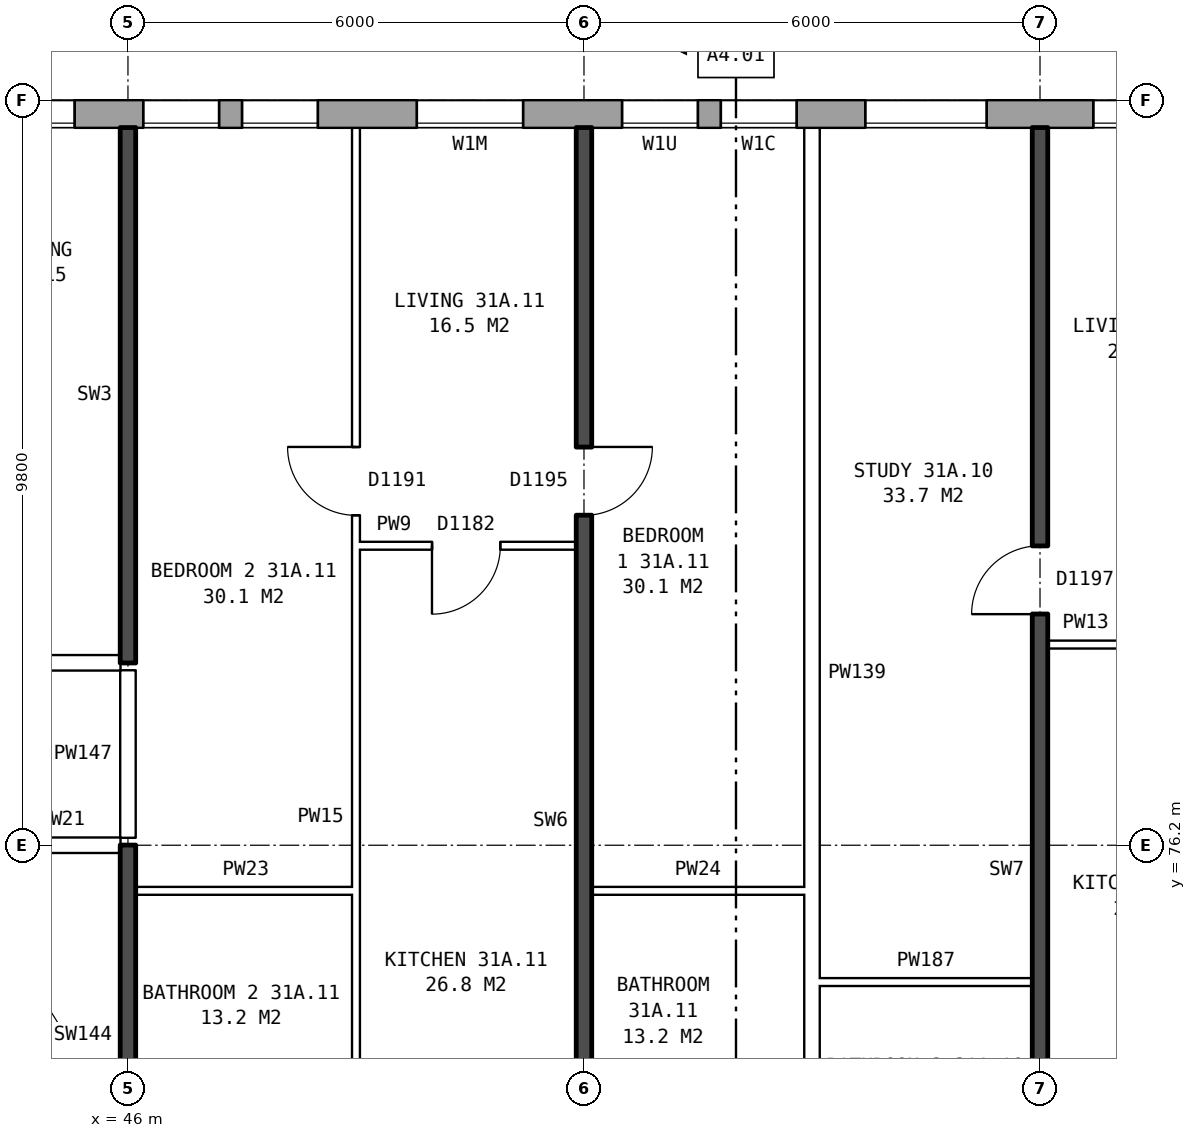
"""IFC4 building model, lengths in metres.
Left out: names, types, materials, properties, quantities, classifications, styles, units other than length and angle.
Written with IfcOpenShell. Run it as: python <this file> out.ifc"""

import sys

from ifc_helpers import new_model, si_unit, direction, frame, frame_2d, origin, place, context, subcontext, project, spatial, rectangle, extrude, element, fill, save


model = new_model("IFC4")
c1 = context("Model", 3, precision=1e-05, world=origin(), true_north=direction((0.0, 1.0)))
c2 = subcontext(c1, "Body", "Model", "MODEL_VIEW")
j1 = project(units=[si_unit("LENGTHUNIT", "METRE"), si_unit("PLANEANGLEUNIT", "RADIAN")], contexts=[c1])
p1 = place(None, origin())
s1 = spatial("IfcSite", under=j1, at=p1, CompositionType="ELEMENT")
p2 = place(p1, origin())
s2 = spatial("IfcBuilding", under=s1, at=p2, CompositionType="ELEMENT")
p3 = place(p2, frame((0.0, 0.0, 111.9)))
s3 = spatial("IfcBuildingStorey", under=s2, at=p3, CompositionType="ELEMENT", Elevation=111.9)
p4 = place(p3, frame((72.925, 85.82, 0.0), z_axis=(0.0, 0.0, 1.0), x_axis=(-1.0, 0.0, 0.0)))
e1 = element("IfcWall", 1, at=p4, inside=s3, PredefinedType="STANDARD", context=c2, shape_type="SweptSolid", body=[
    extrude(rectangle(XDim=44.851, YDim=0.36, at=frame_2d((22.425, 0.0))), origin(), (0.0, 0.0, 1.0), 2.85),
])
p5 = place(p4, frame((0.625, 0.0, 0.8)))
e2 = element("IfcOpeningElement", 2, at=p5, cuts=e1, PredefinedType="OPENING", context=c2, shape_type="SweptSolid", body=[
    extrude(rectangle(XDim=1.6, YDim=1.8, at=frame_2d((0.8, 0.9))), frame((0.0, 0.19, 0.0), z_axis=(0.0, -1.0, 0.0), x_axis=(1.0, 0.0, 0.0)), (0.0, 0.0, 1.0), 0.38),
])
p6 = place(p4, frame((3.625, 0.0, 0.8)))
e3 = element("IfcOpeningElement", 3, at=p6, cuts=e1, PredefinedType="OPENING", context=c2, shape_type="SweptSolid", body=[
    extrude(rectangle(XDim=1.6, YDim=1.8, at=frame_2d((0.8, 0.9))), frame((0.0, 0.19, 0.0), z_axis=(0.0, -1.0, 0.0), x_axis=(1.0, 0.0, 0.0)), (0.0, 0.0, 1.0), 0.38),
])
p7 = place(p4, frame((6.625, 0.0, 0.8)))
e4 = element("IfcOpeningElement", 4, at=p7, cuts=e1, PredefinedType="OPENING", context=c2, shape_type="SweptSolid", body=[
    extrude(rectangle(XDim=1.6, YDim=1.8, at=frame_2d((0.8, 0.9))), frame((0.0, 0.19, 0.0), z_axis=(0.0, -1.0, 0.0), x_axis=(1.0, 0.0, 0.0)), (0.0, 0.0, 1.0), 0.38),
])
p8 = place(p4, frame((9.625, 0.0, 0.8)))
e5 = element("IfcOpeningElement", 5, at=p8, cuts=e1, PredefinedType="OPENING", context=c2, shape_type="SweptSolid", body=[
    extrude(rectangle(XDim=1.6, YDim=1.8, at=frame_2d((0.8, 0.9))), frame((0.0, 0.19, 0.0), z_axis=(0.0, -1.0, 0.0), x_axis=(1.0, 0.0, 0.0)), (0.0, 0.0, 1.0), 0.38),
])
p9 = place(p4, frame((12.625, 0.0, 0.8)))
e6 = element("IfcOpeningElement", 6, at=p9, cuts=e1, PredefinedType="OPENING", context=c2, shape_type="SweptSolid", body=[
    extrude(rectangle(XDim=1.6, YDim=1.8, at=frame_2d((0.8, 0.9))), frame((0.0, 0.19, 0.0), z_axis=(0.0, -1.0, 0.0), x_axis=(1.0, 0.0, 0.0)), (0.0, 0.0, 1.0), 0.38),
])
p10 = place(p4, frame((15.625, 0.0, 0.8)))
e7 = element("IfcOpeningElement", 7, at=p10, cuts=e1, PredefinedType="OPENING", context=c2, shape_type="SweptSolid", body=[
    extrude(rectangle(XDim=1.6, YDim=1.8, at=frame_2d((0.8, 0.9))), frame((0.0, 0.19, 0.0), z_axis=(0.0, -1.0, 0.0), x_axis=(1.0, 0.0, 0.0)), (0.0, 0.0, 1.0), 0.38),
])
p11 = place(p4, frame((18.125, 0.0, 0.8)))
e8 = element("IfcOpeningElement", 8, at=p11, cuts=e1, PredefinedType="OPENING", context=c2, shape_type="SweptSolid", body=[
    extrude(rectangle(XDim=1.0, YDim=1.8, at=frame_2d((0.5, 0.9))), frame((0.0, 0.19, 0.0), z_axis=(0.0, -1.0, 0.0), x_axis=(1.0, 0.0, 0.0)), (0.0, 0.0, 1.0), 0.38),
])
p12 = place(p4, frame((21.725, 0.0, 0.55)))
e9 = element("IfcOpeningElement", 9, at=p12, cuts=e1, PredefinedType="OPENING", context=c2, shape_type="SweptSolid", body=[
    extrude(rectangle(XDim=1.4, YDim=1.2, at=frame_2d((0.7, 0.6))), frame((0.0, 0.19, 0.0), z_axis=(0.0, -1.0, 0.0), x_axis=(1.0, 0.0, 0.0)), (0.0, 0.0, 1.0), 0.38),
])
p13 = place(p4, frame((24.425, 0.0, 1.7)))
e10 = element("IfcOpeningElement", 10, at=p13, cuts=e1, PredefinedType="OPENING", context=c2, shape_type="SweptSolid", body=[
    extrude(rectangle(XDim=1.0, YDim=0.9, at=frame_2d((0.5, 0.45))), frame((0.0, 0.19, 0.0), z_axis=(0.0, -1.0, 0.0), x_axis=(1.0, 0.0, 0.0)), (0.0, 0.0, 1.0), 0.38),
])
p14 = place(p4, frame((27.625, 0.0, 0.8)))
e11 = element("IfcOpeningElement", 11, at=p14, cuts=e1, PredefinedType="OPENING", context=c2, shape_type="SweptSolid", body=[
    extrude(rectangle(XDim=1.6, YDim=1.8, at=frame_2d((0.8, 0.9))), frame((0.0, 0.19, 0.0), z_axis=(0.0, -1.0, 0.0), x_axis=(1.0, 0.0, 0.0)), (0.0, 0.0, 1.0), 0.38),
])
p15 = place(p4, frame((30.625, 0.0, 0.8)))
e12 = element("IfcOpeningElement", 12, at=p15, cuts=e1, PredefinedType="OPENING", context=c2, shape_type="SweptSolid", body=[
    extrude(rectangle(XDim=1.6, YDim=1.8, at=frame_2d((0.8, 0.9))), frame((0.0, 0.19, 0.0), z_axis=(0.0, -1.0, 0.0), x_axis=(1.0, 0.0, 0.0)), (0.0, 0.0, 1.0), 0.38),
])
p16 = place(p4, frame((33.625, 0.0, 0.8)))
e13 = element("IfcOpeningElement", 13, at=p16, cuts=e1, PredefinedType="OPENING", context=c2, shape_type="SweptSolid", body=[
    extrude(rectangle(XDim=1.6, YDim=1.8, at=frame_2d((0.8, 0.9))), frame((0.0, 0.19, 0.0), z_axis=(0.0, -1.0, 0.0), x_axis=(1.0, 0.0, 0.0)), (0.0, 0.0, 1.0), 0.38),
])
p17 = place(p4, frame((36.625, 0.0, 0.8)))
e14 = element("IfcOpeningElement", 14, at=p17, cuts=e1, PredefinedType="OPENING", context=c2, shape_type="SweptSolid", body=[
    extrude(rectangle(XDim=1.6, YDim=1.8, at=frame_2d((0.8, 0.9))), frame((0.0, 0.19, 0.0), z_axis=(0.0, -1.0, 0.0), x_axis=(1.0, 0.0, 0.0)), (0.0, 0.0, 1.0), 0.38),
])
p18 = place(p4, frame((39.625, 0.0, 0.8)))
e15 = element("IfcOpeningElement", 15, at=p18, cuts=e1, PredefinedType="OPENING", context=c2, shape_type="SweptSolid", body=[
    extrude(rectangle(XDim=1.6, YDim=1.8, at=frame_2d((0.8, 0.9))), frame((0.0, 0.19, 0.0), z_axis=(0.0, -1.0, 0.0), x_axis=(1.0, 0.0, 0.0)), (0.0, 0.0, 1.0), 0.38),
])
p19 = place(p4, frame((42.625, 0.0, 0.8)))
e16 = element("IfcOpeningElement", 16, at=p19, cuts=e1, PredefinedType="OPENING", context=c2, shape_type="SweptSolid", body=[
    extrude(rectangle(XDim=1.6, YDim=1.8, at=frame_2d((0.8, 0.9))), frame((0.0, 0.19, 0.0), z_axis=(0.0, -1.0, 0.0), x_axis=(1.0, 0.0, 0.0)), (0.0, 0.0, 1.0), 0.38),
])
p20 = place(p4, frame((19.425, 0.0, 1.7)))
e17 = element("IfcOpeningElement", 17, at=p20, cuts=e1, PredefinedType="OPENING", context=c2, shape_type="SweptSolid", body=[
    extrude(rectangle(XDim=1.0, YDim=0.9, at=frame_2d((0.5, 0.45))), frame((0.0, 0.19, 0.0), z_axis=(0.0, -1.0, 0.0), x_axis=(1.0, 0.0, 0.0)), (0.0, 0.0, 1.0), 0.38),
])
p21 = place(p4, frame((25.725, 0.0, 0.8)))
e18 = element("IfcOpeningElement", 18, at=p21, cuts=e1, PredefinedType="OPENING", context=c2, shape_type="SweptSolid", body=[
    extrude(rectangle(XDim=1.0, YDim=1.8, at=frame_2d((0.5, 0.9))), frame((0.0, 0.19, 0.0), z_axis=(0.0, -1.0, 0.0), x_axis=(1.0, 0.0, 0.0)), (0.0, 0.0, 1.0), 0.38),
])
p22 = place(p3, frame((55.1, 74.4, 0.0), z_axis=(0.0, 0.0, 1.0), x_axis=(1.0, 0.0, 0.0)))
e19 = element("IfcWall", 19, at=p22, inside=s3, PredefinedType="PARTITIONING", context=c2, shape_type="SweptSolid", body=[
    extrude(rectangle(XDim=2.8, YDim=0.1, at=frame_2d((1.4, 0.0))), origin(), (0.0, 0.0, 1.0), 2.85),
])
p23 = place(p3, frame((46.1, 75.6, 0.0), z_axis=(0.0, 0.0, 1.0), x_axis=(1.0, 0.0, 0.0)))
e20 = element("IfcWall", 20, at=p23, inside=s3, PredefinedType="PARTITIONING", context=c2, shape_type="SweptSolid", body=[
    extrude(rectangle(XDim=2.9, YDim=0.1, at=frame_2d((1.45, 0.0))), origin(), (0.0, 0.0, 1.0), 2.85),
])
p24 = place(p3, frame((52.1, 75.6, 0.0), z_axis=(0.0, 0.0, 1.0), x_axis=(1.0, 0.0, 0.0)))
e21 = element("IfcWall", 21, at=p24, inside=s3, PredefinedType="PARTITIONING", context=c2, shape_type="SweptSolid", body=[
    extrude(rectangle(XDim=2.8, YDim=0.1, at=frame_2d((1.4, 0.0))), origin(), (0.0, 0.0, 1.0), 2.85),
])
p25 = place(p3, frame((44.36, 76.2, 0.0), z_axis=(0.0, 0.0, 1.0), x_axis=(1.0, 0.0, 0.0)))
e22 = element("IfcWall", 22, at=p25, inside=s3, PredefinedType="PARTITIONING", context=c2, shape_type="SweptSolid", body=[
    extrude(rectangle(XDim=1.54, YDim=0.2, at=frame_2d((0.77, 0.0))), origin(), (0.0, 0.0, 1.0), 2.85),
])
p26 = place(p3, frame((25.36, 78.6, 0.0), z_axis=(0.0, 0.0, 1.0), x_axis=(1.0, 0.0, 0.0)))
e23 = element("IfcWall", 23, at=p26, inside=s3, PredefinedType="PARTITIONING", context=c2, shape_type="SweptSolid", body=[
    extrude(rectangle(XDim=20.54, YDim=0.2, at=frame_2d((10.27, 0.0))), origin(), (0.0, 0.0, 1.0), 2.85),
])
p27 = place(p26, frame((18.09, 0.0, 0.0)))
e24 = element("IfcOpeningElement", 24, at=p27, cuts=e23, PredefinedType="OPENING", context=c2, shape_type="SweptSolid", body=[
    extrude(rectangle(XDim=1.0, YDim=2.1, at=frame_2d((0.5, 1.05))), frame((0.0, 0.11, 0.0), z_axis=(0.0, -1.0, 0.0), x_axis=(1.0, 0.0, 0.0)), (0.0, 0.0, 1.0), 0.22),
])
p28 = place(p26, frame((12.14, 0.0, 0.0)))
e25 = element("IfcOpeningElement", 25, at=p28, cuts=e23, PredefinedType="OPENING", context=c2, shape_type="SweptSolid", body=[
    extrude(rectangle(XDim=1.0, YDim=2.1, at=frame_2d((0.5, 1.05))), frame((0.0, 0.11, 0.0), z_axis=(0.0, -1.0, 0.0), x_axis=(1.0, 0.0, 0.0)), (0.0, 0.0, 1.0), 0.22),
])
p29 = place(p26, frame((6.34, 0.0, 0.0)))
e26 = element("IfcOpeningElement", 26, at=p29, cuts=e23, PredefinedType="OPENING", context=c2, shape_type="SweptSolid", body=[
    extrude(rectangle(XDim=1.0, YDim=2.1, at=frame_2d((0.5, 1.05))), frame((0.0, 0.11, 0.0), z_axis=(0.0, -1.0, 0.0), x_axis=(1.0, 0.0, 0.0)), (0.0, 0.0, 1.0), 0.22),
])
p30 = place(p3, frame((58.1, 78.84, 0.0), z_axis=(0.0, 0.0, 1.0), x_axis=(1.0, 0.0, 0.0)))
e27 = element("IfcWall", 27, at=p30, inside=s3, PredefinedType="PARTITIONING", context=c2, shape_type="SweptSolid", body=[
    extrude(rectangle(XDim=2.9, YDim=0.1, at=frame_2d((1.45, 0.0))), origin(), (0.0, 0.0, 1.0), 2.85),
])
p31 = place(p30, frame((1.0, 0.0, 0.0)))
e28 = element("IfcOpeningElement", 28, at=p31, cuts=e27, PredefinedType="OPENING", context=c2, shape_type="SweptSolid", body=[
    extrude(rectangle(XDim=0.9, YDim=2.1, at=frame_2d((0.45, 1.05))), frame((0.0, 0.06, 0.0), z_axis=(0.0, -1.0, 0.0), x_axis=(1.0, 0.0, 0.0)), (0.0, 0.0, 1.0), 0.12),
])
p32 = place(p3, frame((49.0, 80.14, 0.0), z_axis=(0.0, 0.0, 1.0), x_axis=(1.0, 0.0, 0.0)))
e29 = element("IfcWall", 29, at=p32, inside=s3, PredefinedType="PARTITIONING", context=c2, shape_type="SweptSolid", body=[
    extrude(rectangle(XDim=2.9, YDim=0.1, at=frame_2d((1.45, 0.0))), origin(), (0.0, 0.0, 1.0), 2.85),
])
p33 = place(p32, frame((1.0, 0.0, 0.0)))
e30 = element("IfcOpeningElement", 30, at=p33, cuts=e29, PredefinedType="OPENING", context=c2, shape_type="SweptSolid", body=[
    extrude(rectangle(XDim=0.9, YDim=2.1, at=frame_2d((0.45, 1.05))), frame((0.0, 0.06, 0.0), z_axis=(0.0, -1.0, 0.0), x_axis=(1.0, 0.0, 0.0)), (0.0, 0.0, 1.0), 0.12),
])
p34 = place(p3, frame((46.0, 71.2, 0.0), z_axis=(0.0, 0.0, 1.0), x_axis=(0.0, 1.0, 0.0)))
e31 = element("IfcWall", 31, at=p34, inside=s3, PredefinedType="SOLIDWALL", context=c2, shape_type="SweptSolid", body=[
    extrude(rectangle(XDim=5.0, YDim=0.2, at=frame_2d((2.5, 0.0))), origin(), (0.0, 0.0, 1.0), 2.85),
])
p35 = place(p3, frame((46.0, 76.3, 0.0), z_axis=(0.0, 0.0, 1.0), x_axis=(0.0, 1.0, 0.0)))
e32 = element("IfcWall", 32, at=p35, inside=s3, PredefinedType="PARTITIONING", context=c2, shape_type="SweptSolid", body=[
    extrude(rectangle(XDim=2.2, YDim=0.2, at=frame_2d((1.1, 0.0))), origin(), (0.0, 0.0, 1.0), 2.85),
])
p36 = place(p3, frame((46.0, 78.6, 0.0), z_axis=(0.0, 0.0, 1.0), x_axis=(0.0, 1.0, 0.0)))
e33 = element("IfcWall", 33, at=p36, inside=s3, PredefinedType="SOLIDWALL", context=c2, shape_type="SweptSolid", body=[
    extrude(rectangle(XDim=7.04, YDim=0.2, at=frame_2d((3.52, 0.0))), origin(), (0.0, 0.0, 1.0), 2.85),
])
p37 = place(p3, frame((49.0, 71.3, 0.0), z_axis=(0.0, 0.0, 1.0), x_axis=(0.0, 1.0, 0.0)))
e34 = element("IfcWall", 34, at=p37, inside=s3, PredefinedType="PARTITIONING", context=c2, shape_type="SweptSolid", body=[
    extrude(rectangle(XDim=14.34, YDim=0.1, at=frame_2d((7.17, 0.0))), origin(), (0.0, 0.0, 1.0), 2.85),
])
p38 = place(p37, frame((9.24, 0.0, 0.0)))
e35 = element("IfcOpeningElement", 35, at=p38, cuts=e34, PredefinedType="OPENING", context=c2, shape_type="SweptSolid", body=[
    extrude(rectangle(XDim=0.9, YDim=2.1, at=frame_2d((0.45, 1.05))), frame((0.0, 0.06, 0.0), z_axis=(0.0, -1.0, 0.0), x_axis=(1.0, 0.0, 0.0)), (0.0, 0.0, 1.0), 0.12),
])
p39 = place(p37, frame((0.4, 0.0, 0.0)))
e36 = element("IfcOpeningElement", 36, at=p39, cuts=e34, PredefinedType="OPENING", context=c2, shape_type="SweptSolid", body=[
    extrude(rectangle(XDim=0.9, YDim=2.1, at=frame_2d((0.45, 1.05))), frame((0.0, 0.06, 0.0), z_axis=(0.0, -1.0, 0.0), x_axis=(1.0, 0.0, 0.0)), (0.0, 0.0, 1.0), 0.12),
])
p40 = place(p3, frame((52.0, 71.2, 0.0), z_axis=(0.0, 0.0, 1.0), x_axis=(0.0, 1.0, 0.0)))
e37 = element("IfcWall", 37, at=p40, inside=s3, PredefinedType="SOLIDWALL", context=c2, shape_type="SweptSolid", body=[
    extrude(rectangle(XDim=14.44, YDim=0.2, at=frame_2d((7.22, 0.0))), origin(), (0.0, 0.0, 1.0), 2.85),
])
p41 = place(p40, frame((9.34, 0.0, 0.0)))
e38 = element("IfcOpeningElement", 38, at=p41, cuts=e37, PredefinedType="OPENING", context=c2, shape_type="SweptSolid", body=[
    extrude(rectangle(XDim=0.9, YDim=2.1, at=frame_2d((0.45, 1.05))), frame((0.0, 0.11, 0.0), z_axis=(0.0, -1.0, 0.0), x_axis=(1.0, 0.0, 0.0)), (0.0, 0.0, 1.0), 0.22),
])
p42 = place(p40, frame((0.4, 0.0, 0.0)))
e39 = element("IfcOpeningElement", 39, at=p42, cuts=e37, PredefinedType="OPENING", context=c2, shape_type="SweptSolid", body=[
    extrude(rectangle(XDim=0.9, YDim=2.1, at=frame_2d((0.45, 1.05))), frame((0.0, 0.11, 0.0), z_axis=(0.0, -1.0, 0.0), x_axis=(1.0, 0.0, 0.0)), (0.0, 0.0, 1.0), 0.22),
])
p43 = place(p3, frame((55.0, 71.3, 0.0), z_axis=(0.0, 0.0, 1.0), x_axis=(0.0, 1.0, 0.0)))
e40 = element("IfcWall", 40, at=p43, inside=s3, PredefinedType="PARTITIONING", context=c2, shape_type="SweptSolid", body=[
    extrude(rectangle(XDim=14.34, YDim=0.2, at=frame_2d((7.17, 0.0))), origin(), (0.0, 0.0, 1.0), 2.85),
])
p44 = place(p3, frame((58.0, 71.2, 0.0), z_axis=(0.0, 0.0, 1.0), x_axis=(0.0, 1.0, 0.0)))
e41 = element("IfcWall", 41, at=p44, inside=s3, PredefinedType="SOLIDWALL", context=c2, shape_type="SweptSolid", body=[
    extrude(rectangle(XDim=14.44, YDim=0.2, at=frame_2d((7.22, 0.0))), origin(), (0.0, 0.0, 1.0), 2.85),
])
p45 = place(p44, frame((8.04, 0.0, 0.0)))
e42 = element("IfcOpeningElement", 42, at=p45, cuts=e41, PredefinedType="OPENING", context=c2, shape_type="SweptSolid", body=[
    extrude(rectangle(XDim=0.9, YDim=2.1, at=frame_2d((0.45, 1.05))), frame((0.0, 0.11, 0.0), z_axis=(0.0, -1.0, 0.0), x_axis=(1.0, 0.0, 0.0)), (0.0, 0.0, 1.0), 0.22),
])
p46 = place(p44, frame((0.4, 0.0, 0.0)))
e43 = element("IfcOpeningElement", 43, at=p46, cuts=e41, PredefinedType="OPENING", context=c2, shape_type="SweptSolid", body=[
    extrude(rectangle(XDim=0.9, YDim=2.1, at=frame_2d((0.45, 1.05))), frame((0.0, 0.11, 0.0), z_axis=(0.0, -1.0, 0.0), x_axis=(1.0, 0.0, 0.0)), (0.0, 0.0, 1.0), 0.22),
])
p47 = place(p9, origin())
e44 = element("IfcWindow", 44, at=p47, inside=s3, PartitioningType="SINGLE_PANEL", PredefinedType="WINDOW", context=c2, shape_type="SweptSolid", body=[
    extrude(rectangle(XDim=1.6, YDim=1.8, at=frame_2d((0.8, 0.9))), frame((0.0, 0.15, 0.0), z_axis=(0.0, -1.0, 0.0), x_axis=(1.0, 0.0, 0.0)), (0.0, 0.0, 1.0), 0.06),
])
fill(e6, e44)
p48 = place(p10, origin())
e45 = element("IfcWindow", 45, at=p48, inside=s3, PartitioningType="SINGLE_PANEL", PredefinedType="WINDOW", context=c2, shape_type="SweptSolid", body=[
    extrude(rectangle(XDim=1.6, YDim=1.8, at=frame_2d((0.8, 0.9))), frame((0.0, 0.15, 0.0), z_axis=(0.0, -1.0, 0.0), x_axis=(1.0, 0.0, 0.0)), (0.0, 0.0, 1.0), 0.06),
])
fill(e7, e45)
p49 = place(p11, origin())
e46 = element("IfcWindow", 46, at=p49, inside=s3, PartitioningType="SINGLE_PANEL", PredefinedType="WINDOW", context=c2, shape_type="SweptSolid", body=[
    extrude(rectangle(XDim=1.0, YDim=1.8, at=frame_2d((0.5, 0.9))), frame((0.0, 0.15, 0.0), z_axis=(0.0, -1.0, 0.0), x_axis=(1.0, 0.0, 0.0)), (0.0, 0.0, 1.0), 0.06),
])
fill(e8, e46)
p50 = place(p12, origin())
e47 = element("IfcWindow", 47, at=p50, inside=s3, PartitioningType="SINGLE_PANEL", PredefinedType="WINDOW", context=c2, shape_type="SweptSolid", body=[
    extrude(rectangle(XDim=1.4, YDim=1.2, at=frame_2d((0.7, 0.6))), frame((0.0, 0.15, 0.0), z_axis=(0.0, -1.0, 0.0), x_axis=(1.0, 0.0, 0.0)), (0.0, 0.0, 1.0), 0.06),
])
fill(e9, e47)
p51 = place(p13, origin())
e48 = element("IfcWindow", 48, at=p51, inside=s3, PartitioningType="SINGLE_PANEL", PredefinedType="WINDOW", context=c2, shape_type="SweptSolid", body=[
    extrude(rectangle(XDim=1.0, YDim=0.9, at=frame_2d((0.5, 0.45))), frame((0.0, 0.15, 0.0), z_axis=(0.0, -1.0, 0.0), x_axis=(1.0, 0.0, 0.0)), (0.0, 0.0, 1.0), 0.06),
])
fill(e10, e48)
p52 = place(p14, origin())
e49 = element("IfcWindow", 49, at=p52, inside=s3, PartitioningType="SINGLE_PANEL", PredefinedType="WINDOW", context=c2, shape_type="SweptSolid", body=[
    extrude(rectangle(XDim=1.6, YDim=1.8, at=frame_2d((0.8, 0.9))), frame((0.0, 0.15, 0.0), z_axis=(0.0, -1.0, 0.0), x_axis=(1.0, 0.0, 0.0)), (0.0, 0.0, 1.0), 0.06),
])
fill(e11, e49)
p53 = place(p45, origin())
e50 = element("IfcDoor", 50, at=p53, inside=s3, OperationType="SINGLE_SWING_LEFT", PredefinedType="DOOR", context=c2, shape_type="SweptSolid", body=[
    extrude(rectangle(XDim=0.9, YDim=2.1, at=frame_2d((0.45, 1.05))), frame((0.0, 0.025, 0.0), z_axis=(0.0, -1.0, 0.0), x_axis=(1.0, 0.0, 0.0)), (0.0, 0.0, 1.0), 0.05),
])
fill(e42, e50)
p54 = place(p41, frame((0.9, 0.0, 0.0), z_axis=(0.0, 0.0, 1.0), x_axis=(-1.0, 0.0, 0.0)))
e51 = element("IfcDoor", 51, at=p54, inside=s3, OperationType="SINGLE_SWING_LEFT", PredefinedType="DOOR", context=c2, shape_type="SweptSolid", body=[
    extrude(rectangle(XDim=0.9, YDim=2.1, at=frame_2d((0.45, 1.05))), frame((0.0, 0.025, 0.0), z_axis=(0.0, -1.0, 0.0), x_axis=(1.0, 0.0, 0.0)), (0.0, 0.0, 1.0), 0.05),
])
fill(e38, e51)
p55 = place(p38, origin())
e52 = element("IfcDoor", 52, at=p55, inside=s3, OperationType="SINGLE_SWING_RIGHT", PredefinedType="DOOR", context=c2, shape_type="SweptSolid", body=[
    extrude(rectangle(XDim=0.9, YDim=2.1, at=frame_2d((0.45, 1.05))), frame((0.0, 0.025, 0.0), z_axis=(0.0, -1.0, 0.0), x_axis=(1.0, 0.0, 0.0)), (0.0, 0.0, 1.0), 0.05),
])
fill(e35, e52)
p56 = place(p33, frame((0.9, 0.0, 0.0), z_axis=(0.0, 0.0, 1.0), x_axis=(-1.0, 0.0, 0.0)))
e53 = element("IfcDoor", 53, at=p56, inside=s3, OperationType="SINGLE_SWING_RIGHT", PredefinedType="DOOR", context=c2, shape_type="SweptSolid", body=[
    extrude(rectangle(XDim=0.9, YDim=2.1, at=frame_2d((0.45, 1.05))), frame((0.0, 0.025, 0.0), z_axis=(0.0, -1.0, 0.0), x_axis=(1.0, 0.0, 0.0)), (0.0, 0.0, 1.0), 0.05),
])
fill(e30, e53)
p57 = place(p20, origin())
e54 = element("IfcWindow", 54, at=p57, inside=s3, PartitioningType="SINGLE_PANEL", PredefinedType="WINDOW", context=c2, shape_type="SweptSolid", body=[
    extrude(rectangle(XDim=1.0, YDim=0.9, at=frame_2d((0.5, 0.45))), frame((0.0, 0.15, 0.0), z_axis=(0.0, -1.0, 0.0), x_axis=(1.0, 0.0, 0.0)), (0.0, 0.0, 1.0), 0.06),
])
fill(e17, e54)
p58 = place(p21, origin())
e55 = element("IfcWindow", 55, at=p58, inside=s3, PartitioningType="SINGLE_PANEL", PredefinedType="WINDOW", context=c2, shape_type="SweptSolid", body=[
    extrude(rectangle(XDim=1.0, YDim=1.8, at=frame_2d((0.5, 0.9))), frame((0.0, 0.15, 0.0), z_axis=(0.0, -1.0, 0.0), x_axis=(1.0, 0.0, 0.0)), (0.0, 0.0, 1.0), 0.06),
])
fill(e18, e55)
save(model, sys.argv[1])
